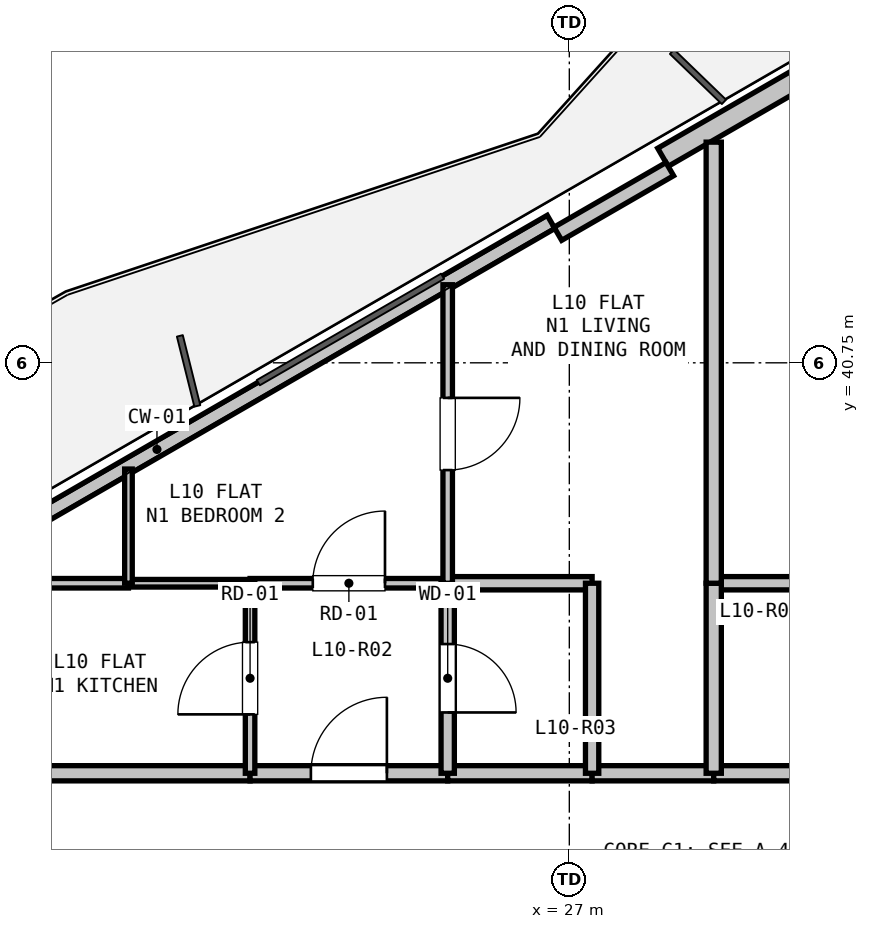
"""IFC4 building model, lengths in metres.
Left out: names, types, materials, properties, quantities, classifications, styles, units other than length and angle.
Written with IfcOpenShell. Run it as: python <this file> out.ifc"""

import sys

from ifc_helpers import new_model, si_unit, direction, frame, frame_2d, origin, place, context, subcontext, project, spatial, rectangle, extrude, element, fill, save


model = new_model("IFC4")
c1 = context("Model", 3, precision=1e-05, world=origin(), true_north=direction((0.0, 1.0)))
c2 = subcontext(c1, "Body", "Model", "MODEL_VIEW")
j1 = project(units=[si_unit("LENGTHUNIT", "METRE"), si_unit("PLANEANGLEUNIT", "RADIAN")], contexts=[c1])
p1 = place(None, origin())
s1 = spatial("IfcSite", under=j1, at=p1, CompositionType="ELEMENT")
p2 = place(p1, origin())
s2 = spatial("IfcBuilding", under=s1, at=p2, CompositionType="ELEMENT")
p3 = place(p2, frame((0.0, 0.0, 39.0)))
s3 = spatial("IfcBuildingStorey", under=s2, at=p3, CompositionType="ELEMENT", Elevation=39.0)
p4 = place(p3, frame((16.39, 36.617, 0.0), z_axis=(0.0, 0.0, 1.0), x_axis=(0.866027351828, 0.499996625875, 0.0)))
e1 = element("IfcWall", 1, at=p4, inside=s3, PredefinedType="PARAPET", context=c2, shape_type="SweptSolid", body=[
    extrude(rectangle(XDim=11.973, YDim=0.2, at=frame_2d((5.987, 0.0))), origin(), (0.0, 0.0, 1.0), 0.2),
])
p5 = place(p3, frame((28.232, 43.454, 0.0), z_axis=(0.0, 0.0, 1.0), x_axis=(0.86603192154, 0.499988710747, 0.0)))
e2 = element("IfcWall", 2, at=p5, inside=s3, PredefinedType="SOLIDWALL", context=c2, shape_type="SweptSolid", body=[
    extrude(rectangle(XDim=12.673, YDim=0.275, at=frame_2d((6.336, 0.0))), origin(), (0.0, 0.0, 1.0), 2.66),
])
p6 = place(p5, frame((2.96, 0.0, 0.9)))
e3 = element("IfcOpeningElement", 3, at=p6, cuts=e2, PredefinedType="OPENING", context=c2, shape_type="SweptSolid", body=[
    extrude(rectangle(XDim=2.1, YDim=1.6, at=frame_2d((1.05, 0.8))), frame((0.0, 0.147, 0.0), z_axis=(0.0, -1.0, 0.0), x_axis=(1.0, 0.0, 0.0)), (0.0, 0.0, 1.0), 0.295),
])
p7 = place(p3, frame((26.85, 42.448, 0.0), z_axis=(0.0, 0.0, 1.0), x_axis=(0.86605165483, 0.499954529098, 0.0)))
e4 = element("IfcWall", 4, at=p7, inside=s3, PredefinedType="PARAPET", context=c2, shape_type="SweptSolid", body=[
    extrude(rectangle(XDim=1.7, YDim=0.2, at=frame_2d((0.85, 0.0))), origin(), (0.0, 0.0, 1.0), 2.66),
])
p8 = place(p3, frame((19.8, 35.35, 0.0), z_axis=(0.0, 0.0, 1.0), x_axis=(1.0, 0.0, 0.0)))
e5 = element("IfcWall", 5, at=p8, inside=s3, PredefinedType="PARTITIONING", context=c2, shape_type="SweptSolid", body=[
    extrude(rectangle(XDim=3.0, YDim=0.2, at=frame_2d((1.5, 0.0))), origin(), (0.0, 0.0, 1.0), 3.04),
])
p9 = place(p3, frame((22.8, 35.35, 0.0), z_axis=(0.0, 0.0, 1.0), x_axis=(1.0, 0.0, 0.0)))
e6 = element("IfcWall", 6, at=p9, inside=s3, PredefinedType="PARTITIONING", context=c2, shape_type="SweptSolid", body=[
    extrude(rectangle(XDim=2.6, YDim=0.2, at=frame_2d((1.3, 0.0))), origin(), (0.0, 0.0, 1.0), 3.04),
])
p10 = place(p9, frame((0.8, 0.0, 0.0)))
e7 = element("IfcOpeningElement", 7, at=p10, cuts=e6, PredefinedType="OPENING", context=c2, shape_type="SweptSolid", body=[
    extrude(rectangle(XDim=1.0, YDim=2.15, at=frame_2d((0.5, 1.075))), frame((0.0, 0.11, 0.0), z_axis=(0.0, -1.0, 0.0), x_axis=(1.0, 0.0, 0.0)), (0.0, 0.0, 1.0), 0.22),
])
p11 = place(p3, frame((25.4, 35.35, 0.0), z_axis=(0.0, 0.0, 1.0), x_axis=(1.0, 0.0, 0.0)))
e8 = element("IfcWall", 8, at=p11, inside=s3, PredefinedType="PARTITIONING", context=c2, shape_type="SweptSolid", body=[
    extrude(rectangle(XDim=1.9, YDim=0.2, at=frame_2d((0.95, 0.0))), origin(), (0.0, 0.0, 1.0), 3.04),
])
p12 = place(p3, frame((27.3, 35.35, 0.0), z_axis=(0.0, 0.0, 1.0), x_axis=(1.0, 0.0, 0.0)))
e9 = element("IfcWall", 9, at=p12, inside=s3, PredefinedType="PARTITIONING", context=c2, shape_type="SweptSolid", body=[
    extrude(rectangle(XDim=1.6, YDim=0.2, at=frame_2d((0.8, 0.0))), origin(), (0.0, 0.0, 1.0), 3.04),
])
p13 = place(p3, frame((28.9, 35.35, 0.0), z_axis=(0.0, 0.0, 1.0), x_axis=(1.0, 0.0, 0.0)))
e10 = element("IfcWall", 10, at=p13, inside=s3, PredefinedType="PARTITIONING", context=c2, shape_type="SweptSolid", body=[
    extrude(rectangle(XDim=2.0, YDim=0.2, at=frame_2d((1.0, 0.0))), origin(), (0.0, 0.0, 1.0), 3.04),
])
p14 = place(p3, frame((22.8, 37.85, 0.0), z_axis=(0.0, 0.0, 1.0), x_axis=(1.0, 0.0, 0.0)))
e11 = element("IfcWall", 11, at=p14, inside=s3, PredefinedType="PARTITIONING", context=c2, shape_type="SweptSolid", body=[
    extrude(rectangle(XDim=2.6, YDim=0.125, at=frame_2d((1.3, 0.0))), origin(), (0.0, 0.0, 1.0), 3.04),
])
p15 = place(p14, frame((0.825, 0.0, 0.0)))
e12 = element("IfcOpeningElement", 12, at=p15, cuts=e11, PredefinedType="OPENING", context=c2, shape_type="SweptSolid", body=[
    extrude(rectangle(XDim=0.95, YDim=2.1, at=frame_2d((0.475, 1.05))), frame((0.0, 0.073, 0.0), z_axis=(0.0, -1.0, 0.0), x_axis=(1.0, 0.0, 0.0)), (0.0, 0.0, 1.0), 0.145),
])
p16 = place(p3, frame((25.4, 37.85, 0.0), z_axis=(0.0, 0.0, 1.0), x_axis=(0.0, -1.0, 0.0)))
e13 = element("IfcWall", 13, at=p16, inside=s3, PredefinedType="PLUMBINGWALL", context=c2, shape_type="SweptSolid", body=[
    extrude(rectangle(XDim=2.5, YDim=0.175, at=frame_2d((1.25, 0.0))), origin(), (0.0, 0.0, 1.0), 3.04),
])
p17 = place(p16, frame((0.8, 0.0, 0.0)))
e14 = element("IfcOpeningElement", 14, at=p17, cuts=e13, PredefinedType="OPENING", context=c2, shape_type="SweptSolid", body=[
    extrude(rectangle(XDim=0.9, YDim=2.1, at=frame_2d((0.45, 1.05))), frame((0.0, 0.097, 0.0), z_axis=(0.0, -1.0, 0.0), x_axis=(1.0, 0.0, 0.0)), (0.0, 0.0, 1.0), 0.195),
])
p18 = place(p3, frame((22.8, 35.35, 0.0), z_axis=(0.0, 0.0, 1.0), x_axis=(0.0, 1.0, 0.0)))
e15 = element("IfcWall", 15, at=p18, inside=s3, PredefinedType="PARTITIONING", context=c2, shape_type="SweptSolid", body=[
    extrude(rectangle(XDim=2.5, YDim=0.125, at=frame_2d((1.25, 0.0))), origin(), (0.0, 0.0, 1.0), 3.04),
])
p19 = place(p18, frame((0.775, 0.0, 0.0)))
e16 = element("IfcOpeningElement", 16, at=p19, cuts=e15, PredefinedType="OPENING", context=c2, shape_type="SweptSolid", body=[
    extrude(rectangle(XDim=0.95, YDim=2.1, at=frame_2d((0.475, 1.05))), frame((0.0, 0.073, 0.0), z_axis=(0.0, -1.0, 0.0), x_axis=(1.0, 0.0, 0.0)), (0.0, 0.0, 1.0), 0.145),
])
p20 = place(p3, frame((25.4, 37.85, 0.0), z_axis=(0.0, 0.0, 1.0), x_axis=(1.0, 0.0, 0.0)))
e17 = element("IfcWall", 17, at=p20, inside=s3, PredefinedType="PLUMBINGWALL", context=c2, shape_type="SweptSolid", body=[
    extrude(rectangle(XDim=1.9, YDim=0.175, at=frame_2d((0.95, 0.0))), origin(), (0.0, 0.0, 1.0), 3.04),
])
p21 = place(p3, frame((27.3, 37.85, 0.0), z_axis=(0.0, 0.0, 1.0), x_axis=(0.0, -1.0, 0.0)))
e18 = element("IfcWall", 18, at=p21, inside=s3, PredefinedType="PLUMBINGWALL", context=c2, shape_type="SweptSolid", body=[
    extrude(rectangle(XDim=2.5, YDim=0.175, at=frame_2d((1.25, 0.0))), origin(), (0.0, 0.0, 1.0), 3.04),
])
p22 = place(p3, frame((19.8, 37.85, 0.0), z_axis=(0.0, 0.0, 1.0), x_axis=(1.0, 0.0, 0.0)))
e19 = element("IfcWall", 19, at=p22, inside=s3, PredefinedType="PARTITIONING", context=c2, shape_type="SweptSolid", body=[
    extrude(rectangle(XDim=1.4, YDim=0.125, at=frame_2d((0.7, 0.0))), origin(), (0.0, 0.0, 1.0), 2.365),
])
p23 = place(p3, frame((21.2, 37.85, 0.0), z_axis=(0.0, 0.0, 1.0), x_axis=(1.0, 0.0, 0.0)))
e20 = element("IfcWall", 20, at=p23, inside=s3, PredefinedType="PARTITIONING", context=c2, shape_type="SweptSolid", body=[
    extrude(rectangle(XDim=1.6, YDim=0.1, at=frame_2d((0.8, 0.0))), origin(), (0.0, 0.0, 1.0), 3.04),
])
p24 = place(p3, frame((28.9, 37.85, 0.0), z_axis=(0.0, 0.0, 1.0), x_axis=(1.0, 0.0, 0.0)))
e21 = element("IfcWall", 21, at=p24, inside=s3, PredefinedType="PLUMBINGWALL", context=c2, shape_type="SweptSolid", body=[
    extrude(rectangle(XDim=2.0, YDim=0.175, at=frame_2d((1.0, 0.0))), origin(), (0.0, 0.0, 1.0), 3.04),
])
p25 = place(p3, frame((28.9, 35.35, 0.0), z_axis=(0.0, 0.0, 1.0), x_axis=(0.0, 1.0, 0.0)))
e22 = element("IfcWall", 22, at=p25, inside=s3, PredefinedType="PARTITIONING", context=c2, shape_type="SweptSolid", body=[
    extrude(rectangle(XDim=2.5, YDim=0.2, at=frame_2d((1.25, 0.0))), origin(), (0.0, 0.0, 1.0), 3.04),
])
p26 = place(p3, frame((21.2, 37.85, 0.0), z_axis=(0.0, 0.0, 1.0), x_axis=(0.0, 1.0, 0.0)))
e23 = element("IfcWall", 23, at=p26, inside=s3, PredefinedType="PARTITIONING", context=c2, shape_type="SweptSolid", body=[
    extrude(rectangle(XDim=1.502, YDim=0.1, at=frame_2d((0.751, 0.0))), origin(), (0.0, 0.0, 1.0), 2.365),
])
p27 = place(p3, frame((25.4, 41.777, 0.0), z_axis=(0.0, 0.0, 1.0), x_axis=(0.0, -1.0, 0.0)))
e24 = element("IfcWall", 24, at=p27, inside=s3, PredefinedType="PARTITIONING", context=c2, shape_type="SweptSolid", body=[
    extrude(rectangle(XDim=3.927, YDim=0.125, at=frame_2d((1.964, 0.0))), origin(), (0.0, 0.0, 1.0), 2.365),
])
p28 = place(p27, frame((1.489, 0.0, 0.0)))
e25 = element("IfcOpeningElement", 25, at=p28, cuts=e24, PredefinedType="OPENING", context=c2, shape_type="SweptSolid", body=[
    extrude(rectangle(XDim=0.95, YDim=2.1, at=frame_2d((0.475, 1.05))), frame((0.0, 0.073, 0.0), z_axis=(0.0, -1.0, 0.0), x_axis=(1.0, 0.0, 0.0)), (0.0, 0.0, 1.0), 0.145),
])
p29 = place(p3, frame((28.9, 43.653, 0.0), z_axis=(0.0, 0.0, 1.0), x_axis=(0.0, -1.0, 0.0)))
e26 = element("IfcWall", 26, at=p29, inside=s3, PredefinedType="PARTITIONING", context=c2, shape_type="SweptSolid", body=[
    extrude(rectangle(XDim=5.803, YDim=0.2, at=frame_2d((2.901, 0.0))), origin(), (0.0, 0.0, 1.0), 2.365),
])
p30 = place(p10, origin())
e27 = element("IfcDoor", 27, at=p30, inside=s3, OperationType="SINGLE_SWING_RIGHT", PredefinedType="DOOR", context=c2, shape_type="SweptSolid", body=[
    extrude(rectangle(XDim=1.0, YDim=2.15, at=frame_2d((0.5, 1.075))), frame((0.0, 0.025, 0.0), z_axis=(0.0, -1.0, 0.0), x_axis=(1.0, 0.0, 0.0)), (0.0, 0.0, 1.0), 0.05),
])
fill(e7, e27)
p31 = place(p17, origin())
e28 = element("IfcDoor", 28, at=p31, inside=s3, OperationType="SINGLE_SWING_RIGHT", PredefinedType="DOOR", context=c2, shape_type="SweptSolid", body=[
    extrude(rectangle(XDim=0.9, YDim=2.1, at=frame_2d((0.45, 1.05))), frame((0.0, 0.025, 0.0), z_axis=(0.0, -1.0, 0.0), x_axis=(1.0, 0.0, 0.0)), (0.0, 0.0, 1.0), 0.05),
])
fill(e14, e28)
p32 = place(p19, origin())
e29 = element("IfcDoor", 29, at=p32, inside=s3, OperationType="SINGLE_SWING_LEFT", PredefinedType="DOOR", context=c2, shape_type="SweptSolid", body=[
    extrude(rectangle(XDim=0.95, YDim=2.1, at=frame_2d((0.475, 1.05))), frame((0.0, 0.025, 0.0), z_axis=(0.0, -1.0, 0.0), x_axis=(1.0, 0.0, 0.0)), (0.0, 0.0, 1.0), 0.05),
])
fill(e16, e29)
p33 = place(p15, origin())
e30 = element("IfcDoor", 30, at=p33, inside=s3, OperationType="SINGLE_SWING_RIGHT", PredefinedType="DOOR", context=c2, shape_type="SweptSolid", body=[
    extrude(rectangle(XDim=0.95, YDim=2.1, at=frame_2d((0.475, 1.05))), frame((0.0, 0.025, 0.0), z_axis=(0.0, -1.0, 0.0), x_axis=(1.0, 0.0, 0.0)), (0.0, 0.0, 1.0), 0.05),
])
fill(e12, e30)
p34 = place(p28, origin())
e31 = element("IfcDoor", 31, at=p34, inside=s3, OperationType="SINGLE_SWING_LEFT", PredefinedType="DOOR", context=c2, shape_type="SweptSolid", body=[
    extrude(rectangle(XDim=0.95, YDim=2.1, at=frame_2d((0.475, 1.05))), frame((0.0, 0.025, 0.0), z_axis=(0.0, -1.0, 0.0), x_axis=(1.0, 0.0, 0.0)), (0.0, 0.0, 1.0), 0.05),
])
fill(e25, e31)
save(model, sys.argv[1])
